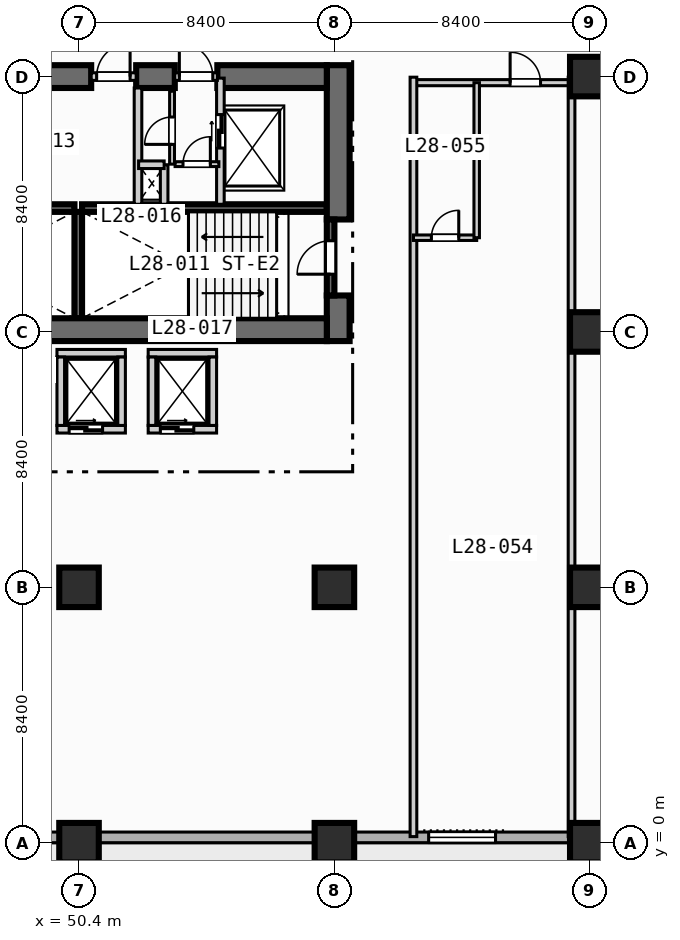
"""IFC4 building model, lengths in metres.
Left out: names, types, materials, properties, quantities, classifications, styles, units other than length and angle.
Written with IfcOpenShell. Run it as: python <this file> out.ifc"""

import sys

from ifc_helpers import new_model, si_unit, direction, frame, frame_2d, origin, origin_2d, place, context, subcontext, project, spatial, rectangle, extrude, element, fill, save


model = new_model("IFC4")
c1 = context("Model", 3, precision=1e-05, world=origin(), true_north=direction((0.0, 1.0)))
c2 = subcontext(c1, "Body", "Model", "MODEL_VIEW")
j1 = project(units=[si_unit("LENGTHUNIT", "METRE"), si_unit("PLANEANGLEUNIT", "RADIAN")], contexts=[c1])
p1 = place(None, origin())
s1 = spatial("IfcSite", under=j1, at=p1, CompositionType="ELEMENT")
p2 = place(p1, origin())
s2 = spatial("IfcBuilding", under=s1, at=p2, CompositionType="ELEMENT")
p3 = place(p2, frame((0.0, 0.0, 119.0)))
s3 = spatial("IfcBuildingStorey", under=s2, at=p3, CompositionType="ELEMENT", Elevation=119.0)
for number, where, z_axis, x_axis in (
    (1, (42.2, 20.875, 0.0), (0.0, 0.0, 1.0), (1.0, 0.0, 0.0)),
    (2, (50.5, 20.875, 0.0), (0.0, 0.0, 1.0), (1.0, 0.0, 0.0)),
):
    element("IfcWall", number, at=place(p3, frame(where, z_axis=z_axis, x_axis=x_axis)), inside=s3, PredefinedType="SOLIDWALL", context=c2, shape_type="SweptSolid", body=[
        extrude(rectangle(XDim=8.05, YDim=0.25, at=frame_2d((4.025, 0.0))), origin(), (0.0, 0.0, 1.0), 3.55),
    ])
p4 = place(p3, frame((50.375, 17.25, 0.0), z_axis=(0.0, 0.0, 1.0), x_axis=(0.0, 1.0, 0.0)))
e3 = element("IfcWall", 3, at=p4, inside=s3, PredefinedType="SOLIDWALL", context=c2, shape_type="SweptSolid", body=[
    extrude(rectangle(XDim=3.5, YDim=0.25, at=frame_2d((1.75, 0.0))), origin(), (0.0, 0.0, 1.0), 3.55),
])
p5 = place(p3, frame((58.925, 16.5, 0.0), z_axis=(0.0, 0.0, 1.0), x_axis=(0.0, 1.0, 0.0)))
e4 = element("IfcWall", 4, at=p5, inside=s3, PredefinedType="SHEAR", context=c2, shape_type="SweptSolid", body=[
    extrude(rectangle(XDim=1.5, YDim=0.75, at=frame_2d((0.75, 0.0))), origin(), (0.0, 0.0, 1.0), 3.55),
])
p6 = place(p3, frame((58.925, 20.5, 0.0), z_axis=(0.0, 0.0, 1.0), x_axis=(0.0, 1.0, 0.0)))
e5 = element("IfcWall", 5, at=p6, inside=s3, PredefinedType="SHEAR", context=c2, shape_type="SweptSolid", body=[
    extrude(rectangle(XDim=5.075, YDim=0.75, at=frame_2d((2.538, 0.0))), origin(), (0.0, 0.0, 1.0), 3.55),
])
p7 = place(p3, frame((42.2, 16.875, 0.0), z_axis=(0.0, 0.0, 1.0), x_axis=(1.0, 0.0, 0.0)))
e6 = element("IfcWall", 6, at=p7, inside=s3, PredefinedType="SHEAR", context=c2, shape_type="SweptSolid", body=[
    extrude(rectangle(XDim=16.35, YDim=0.75, at=frame_2d((8.175, 0.0))), origin(), (0.0, 0.0, 1.0), 3.55),
])
p8 = place(p3, frame((42.2, 25.2, 0.0), z_axis=(0.0, 0.0, 1.0), x_axis=(1.0, 0.0, 0.0)))
e7 = element("IfcWall", 7, at=p8, inside=s3, PredefinedType="SHEAR", context=c2, shape_type="SweptSolid", body=[
    extrude(rectangle(XDim=8.6, YDim=0.75, at=frame_2d((4.3, 0.0))), origin(), (0.0, 0.0, 1.0), 3.55),
])
p9 = place(p3, frame((52.28, 25.2, 0.0), z_axis=(0.0, 0.0, 1.0), x_axis=(1.0, 0.0, 0.0)))
e8 = element("IfcWall", 8, at=p9, inside=s3, PredefinedType="SHEAR", context=c2, shape_type="SweptSolid", body=[
    extrude(rectangle(XDim=1.27, YDim=0.75, at=frame_2d((0.635, 0.0))), origin(), (0.0, 0.0, 1.0), 3.55),
])
p10 = place(p3, frame((54.95, 25.2, 0.0), z_axis=(0.0, 0.0, 1.0), x_axis=(1.0, 0.0, 0.0)))
e9 = element("IfcWall", 9, at=p10, inside=s3, PredefinedType="SHEAR", context=c2, shape_type="SweptSolid", body=[
    extrude(rectangle(XDim=3.6, YDim=0.75, at=frame_2d((1.8, 0.0))), origin(), (0.0, 0.0, 1.0), 3.55),
])
for number, where, z_axis, x_axis in (
    (10, (50.4, 0.0, 0.0), (0.0, 0.0, 1.0), (1.0, 0.0, 0.0)),
    (11, (50.4, 8.4, 0.0), (0.0, 0.0, 1.0), (1.0, 0.0, 0.0)),
    (12, (58.8, 0.0, 0.0), (0.0, 0.0, 1.0), (1.0, 0.0, 0.0)),
    (13, (58.8, 8.4, 0.0), (0.0, 0.0, 1.0), (1.0, 0.0, 0.0)),
    (14, (67.2, 0.0, 0.0), (0.0, 0.0, 1.0), (1.0, 0.0, 0.0)),
    (15, (67.2, 8.4, 0.0), (0.0, 0.0, 1.0), (1.0, 0.0, 0.0)),
    (16, (67.2, 16.8, 0.0), (0.0, 0.0, 1.0), (1.0, 0.0, 0.0)),
    (17, (67.2, 25.2, 0.0), (0.0, 0.0, 1.0), (1.0, 0.0, 0.0)),
):
    element("IfcColumn", number, at=place(p3, frame(where, z_axis=z_axis, x_axis=x_axis)), inside=s3, PredefinedType="COLUMN", context=c2, shape_type="SweptSolid", body=[
        extrude(rectangle(XDim=1.3, YDim=1.3, at=origin_2d()), origin(), (0.0, 0.0, 1.0), 3.8),
    ])
p11 = place(p3, frame((72.425, 0.175, 0.0), z_axis=(0.0, 0.0, 1.0), x_axis=(-1.0, 0.0, 0.0)))
e18 = element("IfcWall", 18, at=p11, inside=s3, PredefinedType="STANDARD", context=c2, shape_type="SweptSolid", body=[
    extrude(rectangle(XDim=69.25, YDim=0.35, at=frame_2d((34.625, 0.0))), origin(), (0.0, 0.0, 1.0), 3.55),
])
p12 = place(p11, frame((50.725, 0.0, 0.0)))
e19 = element("IfcOpeningElement", 19, at=p12, cuts=e18, PredefinedType="OPENING", context=c2, shape_type="SweptSolid", body=[
    extrude(rectangle(XDim=1.4, YDim=2.2, at=frame_2d((0.7, 1.1))), frame((0.0, 0.185, 0.0), z_axis=(0.0, -1.0, 0.0), x_axis=(1.0, 0.0, 0.0)), (0.0, 0.0, 1.0), 0.37),
])
p13 = place(p11, frame((58.725, 0.0, 0.85)))
e20 = element("IfcOpeningElement", 20, at=p13, cuts=e18, PredefinedType="OPENING", context=c2, shape_type="SweptSolid", body=[
    extrude(rectangle(XDim=2.2, YDim=1.8, at=frame_2d((1.1, 0.9))), frame((0.0, 0.185, 0.0), z_axis=(0.0, -1.0, 0.0), x_axis=(1.0, 0.0, 0.0)), (0.0, 0.0, 1.0), 0.37),
])
p14 = place(p11, frame((41.925, 0.0, 0.85)))
e21 = element("IfcOpeningElement", 21, at=p14, cuts=e18, PredefinedType="OPENING", context=c2, shape_type="SweptSolid", body=[
    extrude(rectangle(XDim=2.2, YDim=1.8, at=frame_2d((1.1, 0.9))), frame((0.0, 0.185, 0.0), z_axis=(0.0, -1.0, 0.0), x_axis=(1.0, 0.0, 0.0)), (0.0, 0.0, 1.0), 0.37),
])
p15 = place(p11, frame((33.525, 0.0, 0.85)))
e22 = element("IfcOpeningElement", 22, at=p15, cuts=e18, PredefinedType="OPENING", context=c2, shape_type="SweptSolid", body=[
    extrude(rectangle(XDim=2.2, YDim=1.8, at=frame_2d((1.1, 0.9))), frame((0.0, 0.185, 0.0), z_axis=(0.0, -1.0, 0.0), x_axis=(1.0, 0.0, 0.0)), (0.0, 0.0, 1.0), 0.37),
])
p16 = place(p11, frame((25.125, 0.0, 0.85)))
e23 = element("IfcOpeningElement", 23, at=p16, cuts=e18, PredefinedType="OPENING", context=c2, shape_type="SweptSolid", body=[
    extrude(rectangle(XDim=2.2, YDim=1.8, at=frame_2d((1.1, 0.9))), frame((0.0, 0.185, 0.0), z_axis=(0.0, -1.0, 0.0), x_axis=(1.0, 0.0, 0.0)), (0.0, 0.0, 1.0), 0.37),
])
p17 = place(p11, frame((8.325, 0.0, 0.85)))
e24 = element("IfcOpeningElement", 24, at=p17, cuts=e18, PredefinedType="OPENING", context=c2, shape_type="SweptSolid", body=[
    extrude(rectangle(XDim=2.2, YDim=1.8, at=frame_2d((1.1, 0.9))), frame((0.0, 0.185, 0.0), z_axis=(0.0, -1.0, 0.0), x_axis=(1.0, 0.0, 0.0)), (0.0, 0.0, 1.0), 0.37),
])
p18 = place(p11, frame((2.125, 0.0, 0.85)))
e25 = element("IfcOpeningElement", 25, at=p18, cuts=e18, PredefinedType="OPENING", context=c2, shape_type="SweptSolid", body=[
    extrude(rectangle(XDim=1.8, YDim=1.8, at=frame_2d((0.9, 0.9))), frame((0.0, 0.185, 0.0), z_axis=(0.0, -1.0, 0.0), x_axis=(1.0, 0.0, 0.0)), (0.0, 0.0, 1.0), 0.37),
])
p19 = place(p3, frame((58.675, 18.0, 0.0), z_axis=(0.0, 0.0, 1.0), x_axis=(0.0, 1.0, 0.0)))
e26 = element("IfcWall", 26, at=p19, inside=s3, PredefinedType="SOLIDWALL", context=c2, shape_type="SweptSolid", body=[
    extrude(rectangle(XDim=2.5, YDim=0.25, at=frame_2d((1.25, 0.0))), origin(), (0.0, 0.0, 1.0), 3.55),
])
p20 = place(p19, frame((0.7, 0.0, 0.0)))
e27 = element("IfcOpeningElement", 27, at=p20, cuts=e26, PredefinedType="OPENING", context=c2, shape_type="SweptSolid", body=[
    extrude(rectangle(XDim=1.1, YDim=2.15, at=frame_2d((0.55, 1.075))), frame((0.0, 0.135, 0.0), z_axis=(0.0, -1.0, 0.0), x_axis=(1.0, 0.0, 0.0)), (0.0, 0.0, 1.0), 0.27),
])
p21 = place(p3, frame((50.8, 25.2, 0.0), z_axis=(0.0, 0.0, 1.0), x_axis=(1.0, 0.0, 0.0)))
e28 = element("IfcWall", 28, at=p21, inside=s3, PredefinedType="SOLIDWALL", context=c2, shape_type="SweptSolid", body=[
    extrude(rectangle(XDim=1.48, YDim=0.25, at=frame_2d((0.74, 0.0))), origin(), (0.0, 0.0, 1.0), 3.55),
])
p22 = place(p21, frame((0.18, 0.0, 0.0)))
e29 = element("IfcOpeningElement", 29, at=p22, cuts=e28, PredefinedType="OPENING", context=c2, shape_type="SweptSolid", body=[
    extrude(rectangle(XDim=1.1, YDim=2.15, at=frame_2d((0.55, 1.075))), frame((0.0, 0.135, 0.0), z_axis=(0.0, -1.0, 0.0), x_axis=(1.0, 0.0, 0.0)), (0.0, 0.0, 1.0), 0.27),
])
p23 = place(p3, frame((52.34, 21.0, 0.0), z_axis=(0.0, 0.0, 1.0), x_axis=(0.0, 1.0, 0.0)))
e30 = element("IfcWall", 30, at=p23, inside=s3, PredefinedType="SOLIDWALL", context=c2, shape_type="SweptSolid", body=[
    extrude(rectangle(XDim=3.825, YDim=0.25, at=frame_2d((1.913, 0.0))), origin(), (0.0, 0.0, 1.0), 3.55),
])
p24 = place(p3, frame((55.05, 21.0, 0.0), z_axis=(0.0, 0.0, 1.0), x_axis=(0.0, 1.0, 0.0)))
e31 = element("IfcWall", 31, at=p24, inside=s3, PredefinedType="SOLIDWALL", context=c2, shape_type="SweptSolid", body=[
    extrude(rectangle(XDim=4.15, YDim=0.25, at=frame_2d((2.075, 0.0))), origin(), (0.0, 0.0, 1.0), 3.55),
])
p25 = place(p24, frame((1.85, 0.0, 0.0)))
e32 = element("IfcOpeningElement", 32, at=p25, cuts=e31, PredefinedType="OPENING", context=c2, shape_type="SweptSolid", body=[
    extrude(rectangle(XDim=1.1, YDim=2.15, at=frame_2d((0.55, 1.075))), frame((0.0, 0.135, 0.0), z_axis=(0.0, -1.0, 0.0), x_axis=(1.0, 0.0, 0.0)), (0.0, 0.0, 1.0), 0.27),
])
p26 = place(p3, frame((53.55, 25.2, 0.0), z_axis=(0.0, 0.0, 1.0), x_axis=(1.0, 0.0, 0.0)))
e33 = element("IfcWall", 33, at=p26, inside=s3, PredefinedType="SOLIDWALL", context=c2, shape_type="SweptSolid", body=[
    extrude(rectangle(XDim=1.4, YDim=0.25, at=frame_2d((0.7, 0.0))), origin(), (0.0, 0.0, 1.0), 3.55),
])
p27 = place(p26, frame((0.15, 0.0, 0.0)))
e34 = element("IfcOpeningElement", 34, at=p27, cuts=e33, PredefinedType="OPENING", context=c2, shape_type="SweptSolid", body=[
    extrude(rectangle(XDim=1.1, YDim=2.15, at=frame_2d((0.55, 1.075))), frame((0.0, 0.135, 0.0), z_axis=(0.0, -1.0, 0.0), x_axis=(1.0, 0.0, 0.0)), (0.0, 0.0, 1.0), 0.27),
])
p28 = place(p3, frame((53.2, 21.0, 0.0), z_axis=(0.0, 0.0, 1.0), x_axis=(0.0, 1.0, 0.0)))
e35 = element("IfcWall", 35, at=p28, inside=s3, PredefinedType="SOLIDWALL", context=c2, shape_type="SweptSolid", body=[
    extrude(rectangle(XDim=1.3, YDim=0.25, at=frame_2d((0.65, 0.0))), origin(), (0.0, 0.0, 1.0), 3.55),
])
p29 = place(p3, frame((52.36, 22.3, 0.0), z_axis=(0.0, 0.0, 1.0), x_axis=(1.0, 0.0, 0.0)))
e36 = element("IfcWall", 36, at=p29, inside=s3, PredefinedType="SOLIDWALL", context=c2, shape_type="SweptSolid", body=[
    extrude(rectangle(XDim=0.84, YDim=0.25, at=frame_2d((0.42, 0.0))), origin(), (0.0, 0.0, 1.0), 3.55),
])
p30 = place(p3, frame((53.56, 22.32, 0.0), z_axis=(0.0, 0.0, 1.0), x_axis=(1.0, 0.0, 0.0)))
e37 = element("IfcWall", 37, at=p30, inside=s3, PredefinedType="PARTITIONING", context=c2, shape_type="SweptSolid", body=[
    extrude(rectangle(XDim=1.44, YDim=0.16, at=frame_2d((0.72, 0.0))), origin(), (0.0, 0.0, 1.0), 3.55),
])
p31 = place(p30, frame((0.26, 0.0, 0.0)))
e38 = element("IfcOpeningElement", 38, at=p31, cuts=e37, PredefinedType="OPENING", context=c2, shape_type="SweptSolid", body=[
    extrude(rectangle(XDim=0.9, YDim=2.1, at=frame_2d((0.45, 1.05))), frame((0.0, 0.09, 0.0), z_axis=(0.0, -1.0, 0.0), x_axis=(1.0, 0.0, 0.0)), (0.0, 0.0, 1.0), 0.18),
])
p32 = place(p3, frame((53.46, 22.32, 0.0), z_axis=(0.0, 0.0, 1.0), x_axis=(0.0, 1.0, 0.0)))
e39 = element("IfcWall", 39, at=p32, inside=s3, PredefinedType="PARTITIONING", context=c2, shape_type="SweptSolid", body=[
    extrude(rectangle(XDim=2.4, YDim=0.16, at=frame_2d((1.2, 0.0))), origin(), (0.0, 0.0, 1.0), 3.55),
])
p33 = place(p32, frame((0.65, 0.0, 0.0)))
e40 = element("IfcOpeningElement", 40, at=p33, cuts=e39, PredefinedType="OPENING", context=c2, shape_type="SweptSolid", body=[
    extrude(rectangle(XDim=0.9, YDim=2.1, at=frame_2d((0.45, 1.05))), frame((0.0, 0.09, 0.0), z_axis=(0.0, -1.0, 0.0), x_axis=(1.0, 0.0, 0.0)), (0.0, 0.0, 1.0), 0.18),
])
p34 = place(p3, frame((49.675, 13.6, 0.0), z_axis=(0.0, 0.0, 1.0), x_axis=(1.0, 0.0, 0.0)))
e41 = element("IfcWall", 41, at=p34, inside=s3, PredefinedType="SOLIDWALL", context=c2, shape_type="SweptSolid", body=[
    extrude(rectangle(XDim=2.25, YDim=0.25, at=frame_2d((1.125, 0.0))), origin(), (0.0, 0.0, 1.0), 3.55),
])
p35 = place(p34, frame((0.4, 0.0, 0.0)))
e42 = element("IfcOpeningElement", 42, at=p35, cuts=e41, PredefinedType="OPENING", context=c2, shape_type="SweptSolid", body=[
    extrude(rectangle(XDim=1.1, YDim=2.15, at=frame_2d((0.55, 1.075))), frame((0.0, 0.135, 0.0), z_axis=(0.0, -1.0, 0.0), x_axis=(1.0, 0.0, 0.0)), (0.0, 0.0, 1.0), 0.27),
])
for number, where, z_axis, x_axis in (
    (43, (49.675, 16.1, 0.0), (0.0, 0.0, 1.0), (1.0, 0.0, 0.0)),
    (44, (49.8, 13.725, 0.0), (0.0, 0.0, 1.0), (0.0, 1.0, 0.0)),
    (45, (51.8, 13.725, 0.0), (0.0, 0.0, 1.0), (0.0, 1.0, 0.0)),
):
    element("IfcWall", number, at=place(p3, frame(where, z_axis=z_axis, x_axis=x_axis)), inside=s3, PredefinedType="SOLIDWALL", context=c2, shape_type="SweptSolid", body=[
        extrude(rectangle(XDim=2.25, YDim=0.25, at=frame_2d((1.125, 0.0))), origin(), (0.0, 0.0, 1.0), 3.55),
    ])
p36 = place(p3, frame((52.675, 13.6, 0.0), z_axis=(0.0, 0.0, 1.0), x_axis=(1.0, 0.0, 0.0)))
e46 = element("IfcWall", 46, at=p36, inside=s3, PredefinedType="SOLIDWALL", context=c2, shape_type="SweptSolid", body=[
    extrude(rectangle(XDim=2.25, YDim=0.25, at=frame_2d((1.125, 0.0))), origin(), (0.0, 0.0, 1.0), 3.55),
])
p37 = place(p36, frame((0.4, 0.0, 0.0)))
e47 = element("IfcOpeningElement", 47, at=p37, cuts=e46, PredefinedType="OPENING", context=c2, shape_type="SweptSolid", body=[
    extrude(rectangle(XDim=1.1, YDim=2.15, at=frame_2d((0.55, 1.075))), frame((0.0, 0.135, 0.0), z_axis=(0.0, -1.0, 0.0), x_axis=(1.0, 0.0, 0.0)), (0.0, 0.0, 1.0), 0.27),
])
for number, where, z_axis, x_axis in (
    (48, (52.675, 16.1, 0.0), (0.0, 0.0, 1.0), (1.0, 0.0, 0.0)),
    (49, (52.8, 13.725, 0.0), (0.0, 0.0, 1.0), (0.0, 1.0, 0.0)),
    (50, (54.8, 13.725, 0.0), (0.0, 0.0, 1.0), (0.0, 1.0, 0.0)),
):
    element("IfcWall", number, at=place(p3, frame(where, z_axis=z_axis, x_axis=x_axis)), inside=s3, PredefinedType="SOLIDWALL", context=c2, shape_type="SweptSolid", body=[
        extrude(rectangle(XDim=2.25, YDim=0.25, at=frame_2d((1.125, 0.0))), origin(), (0.0, 0.0, 1.0), 3.55),
    ])
p38 = place(p3, frame((61.4, 25.0, 0.0), z_axis=(0.0, 0.0, 1.0), x_axis=(1.0, 0.0, 0.0)))
e51 = element("IfcWall", 51, at=p38, inside=s3, PredefinedType="PARTITIONING", context=c2, shape_type="SweptSolid", body=[
    extrude(rectangle(XDim=10.8, YDim=0.2, at=frame_2d((5.4, 0.0))), origin(), (0.0, 0.0, 1.0), 2.8),
])
p39 = place(p38, frame((3.18, 0.0, 0.0)))
e52 = element("IfcOpeningElement", 52, at=p39, cuts=e51, PredefinedType="OPENING", context=c2, shape_type="SweptSolid", body=[
    extrude(rectangle(XDim=1.0, YDim=2.15, at=frame_2d((0.5, 1.075))), frame((0.0, 0.11, 0.0), z_axis=(0.0, -1.0, 0.0), x_axis=(1.0, 0.0, 0.0)), (0.0, 0.0, 1.0), 0.22),
])
p40 = place(p38, frame((6.84, 0.0, 0.0)))
e53 = element("IfcOpeningElement", 53, at=p40, cuts=e51, PredefinedType="OPENING", context=c2, shape_type="SweptSolid", body=[
    extrude(rectangle(XDim=1.0, YDim=2.15, at=frame_2d((0.5, 1.075))), frame((0.0, 0.11, 0.0), z_axis=(0.0, -1.0, 0.0), x_axis=(1.0, 0.0, 0.0)), (0.0, 0.0, 1.0), 0.22),
])
p41 = place(p3, frame((61.4, 0.2, 0.0), z_axis=(0.0, 0.0, 1.0), x_axis=(0.0, 1.0, 0.0)))
e54 = element("IfcWall", 54, at=p41, inside=s3, PredefinedType="PARTITIONING", context=c2, shape_type="SweptSolid", body=[
    extrude(rectangle(XDim=24.98, YDim=0.22, at=frame_2d((12.49, 0.0))), origin(), (0.0, 0.0, 1.0), 3.55),
])
p42 = place(p3, frame((61.4, 19.9, 0.0), z_axis=(0.0, 0.0, 1.0), x_axis=(1.0, 0.0, 0.0)))
e55 = element("IfcWall", 55, at=p42, inside=s3, PredefinedType="PLUMBINGWALL", context=c2, shape_type="SweptSolid", body=[
    extrude(rectangle(XDim=2.08, YDim=0.18, at=frame_2d((1.04, 0.0))), origin(), (0.0, 0.0, 1.0), 3.55),
])
p43 = place(p42, frame((0.59, 0.0, 0.0)))
e56 = element("IfcOpeningElement", 56, at=p43, cuts=e55, PredefinedType="OPENING", context=c2, shape_type="SweptSolid", body=[
    extrude(rectangle(XDim=0.9, YDim=2.1, at=frame_2d((0.45, 1.05))), frame((0.0, 0.1, 0.0), z_axis=(0.0, -1.0, 0.0), x_axis=(1.0, 0.0, 0.0)), (0.0, 0.0, 1.0), 0.2),
])
p44 = place(p3, frame((63.48, 19.9, 0.0), z_axis=(0.0, 0.0, 1.0), x_axis=(0.0, 1.0, 0.0)))
e57 = element("IfcWall", 57, at=p44, inside=s3, PredefinedType="PLUMBINGWALL", context=c2, shape_type="SweptSolid", body=[
    extrude(rectangle(XDim=5.1, YDim=0.18, at=frame_2d((2.55, 0.0))), origin(), (0.0, 0.0, 1.0), 3.55),
])
p45 = place(p3, frame((66.6, 0.2, 0.0), z_axis=(0.0, 0.0, 1.0), x_axis=(0.0, 1.0, 0.0)))
e58 = element("IfcWall", 58, at=p45, inside=s3, PredefinedType="PARTITIONING", context=c2, shape_type="SweptSolid", body=[
    extrude(rectangle(XDim=24.98, YDim=0.22, at=frame_2d((12.49, 0.0))), origin(), (0.0, 0.0, 1.0), 3.55),
])
p46 = place(p17, origin())
e59 = element("IfcWindow", 59, at=p46, inside=s3, PartitioningType="SINGLE_PANEL", PredefinedType="WINDOW", context=c2, shape_type="SweptSolid", body=[
    extrude(rectangle(XDim=2.2, YDim=1.8, at=frame_2d((1.1, 0.9))), frame((0.0, 0.03, 0.0), z_axis=(0.0, -1.0, 0.0), x_axis=(1.0, 0.0, 0.0)), (0.0, 0.0, 1.0), 0.06),
])
fill(e24, e59)
p47 = place(p20, origin())
e60 = element("IfcDoor", 60, at=p47, inside=s3, OperationType="SINGLE_SWING_LEFT", PredefinedType="DOOR", context=c2, shape_type="SweptSolid", body=[
    extrude(rectangle(XDim=1.1, YDim=2.15, at=frame_2d((0.55, 1.075))), frame((0.0, 0.025, 0.0), z_axis=(0.0, -1.0, 0.0), x_axis=(1.0, 0.0, 0.0)), (0.0, 0.0, 1.0), 0.05),
])
fill(e27, e60)
p48 = place(p22, origin())
e61 = element("IfcDoor", 61, at=p48, inside=s3, OperationType="SINGLE_SWING_RIGHT", PredefinedType="DOOR", context=c2, shape_type="SweptSolid", body=[
    extrude(rectangle(XDim=1.1, YDim=2.15, at=frame_2d((0.55, 1.075))), frame((0.0, 0.025, 0.0), z_axis=(0.0, -1.0, 0.0), x_axis=(1.0, 0.0, 0.0)), (0.0, 0.0, 1.0), 0.05),
])
fill(e29, e61)
p49 = place(p25, origin())
e62 = element("IfcDoor", 62, at=p49, inside=s3, OperationType="SLIDING_TO_LEFT", PredefinedType="DOOR", context=c2, shape_type="SweptSolid", body=[
    extrude(rectangle(XDim=1.1, YDim=2.15, at=frame_2d((0.55, 1.075))), frame((0.0, 0.025, 0.0), z_axis=(0.0, -1.0, 0.0), x_axis=(1.0, 0.0, 0.0)), (0.0, 0.0, 1.0), 0.05),
])
fill(e32, e62)
p50 = place(p27, origin())
e63 = element("IfcDoor", 63, at=p50, inside=s3, OperationType="SINGLE_SWING_LEFT", PredefinedType="DOOR", context=c2, shape_type="SweptSolid", body=[
    extrude(rectangle(XDim=1.1, YDim=2.15, at=frame_2d((0.55, 1.075))), frame((0.0, 0.025, 0.0), z_axis=(0.0, -1.0, 0.0), x_axis=(1.0, 0.0, 0.0)), (0.0, 0.0, 1.0), 0.05),
])
fill(e34, e63)
p51 = place(p31, origin())
e64 = element("IfcDoor", 64, at=p51, inside=s3, OperationType="SINGLE_SWING_RIGHT", PredefinedType="DOOR", context=c2, shape_type="SweptSolid", body=[
    extrude(rectangle(XDim=0.9, YDim=2.1, at=frame_2d((0.45, 1.05))), frame((0.0, 0.025, 0.0), z_axis=(0.0, -1.0, 0.0), x_axis=(1.0, 0.0, 0.0)), (0.0, 0.0, 1.0), 0.05),
])
fill(e38, e64)
p52 = place(p33, origin())
e65 = element("IfcDoor", 65, at=p52, inside=s3, OperationType="SINGLE_SWING_LEFT", PredefinedType="DOOR", context=c2, shape_type="SweptSolid", body=[
    extrude(rectangle(XDim=0.9, YDim=2.1, at=frame_2d((0.45, 1.05))), frame((0.0, 0.025, 0.0), z_axis=(0.0, -1.0, 0.0), x_axis=(1.0, 0.0, 0.0)), (0.0, 0.0, 1.0), 0.05),
])
fill(e40, e65)
p53 = place(p35, origin())
e66 = element("IfcDoor", 66, at=p53, inside=s3, OperationType="SLIDING_TO_LEFT", PredefinedType="DOOR", context=c2, shape_type="SweptSolid", body=[
    extrude(rectangle(XDim=1.1, YDim=2.15, at=frame_2d((0.55, 1.075))), frame((0.0, 0.025, 0.0), z_axis=(0.0, -1.0, 0.0), x_axis=(1.0, 0.0, 0.0)), (0.0, 0.0, 1.0), 0.05),
])
fill(e42, e66)
p54 = place(p37, origin())
e67 = element("IfcDoor", 67, at=p54, inside=s3, OperationType="SLIDING_TO_LEFT", PredefinedType="DOOR", context=c2, shape_type="SweptSolid", body=[
    extrude(rectangle(XDim=1.1, YDim=2.15, at=frame_2d((0.55, 1.075))), frame((0.0, 0.025, 0.0), z_axis=(0.0, -1.0, 0.0), x_axis=(1.0, 0.0, 0.0)), (0.0, 0.0, 1.0), 0.05),
])
fill(e47, e67)
p55 = place(p39, origin())
e68 = element("IfcDoor", 68, at=p55, inside=s3, OperationType="SINGLE_SWING_LEFT", PredefinedType="DOOR", context=c2, shape_type="SweptSolid", body=[
    extrude(rectangle(XDim=1.0, YDim=2.15, at=frame_2d((0.5, 1.075))), frame((0.0, 0.025, 0.0), z_axis=(0.0, -1.0, 0.0), x_axis=(1.0, 0.0, 0.0)), (0.0, 0.0, 1.0), 0.05),
])
fill(e52, e68)
p56 = place(p43, origin())
e69 = element("IfcDoor", 69, at=p56, inside=s3, OperationType="SINGLE_SWING_RIGHT", PredefinedType="DOOR", context=c2, shape_type="SweptSolid", body=[
    extrude(rectangle(XDim=0.9, YDim=2.1, at=frame_2d((0.45, 1.05))), frame((0.0, 0.025, 0.0), z_axis=(0.0, -1.0, 0.0), x_axis=(1.0, 0.0, 0.0)), (0.0, 0.0, 1.0), 0.05),
])
fill(e56, e69)
save(model, sys.argv[1])
